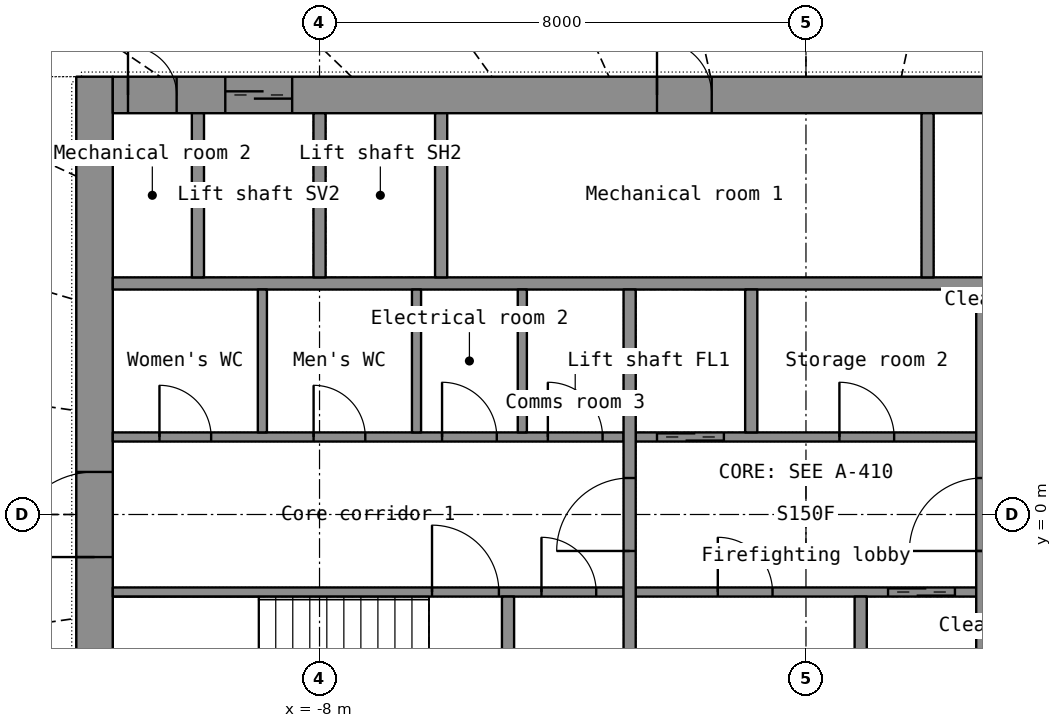
"""IFC4 building model, lengths in metres.
Left out: names, types, materials, properties, quantities, classifications, styles, units other than length and angle.
Written with IfcOpenShell. Run it as: python <this file> out.ifc"""

import sys

from ifc_helpers import new_model, si_unit, direction, frame, frame_2d, origin, place, context, subcontext, project, spatial, rectangle, extrude, element, fill, save


model = new_model("IFC4")
c1 = context("Model", 3, precision=1e-05, world=origin(), true_north=direction((0.0, 1.0)))
c2 = subcontext(c1, "Body", "Model", "MODEL_VIEW")
j1 = project(units=[si_unit("LENGTHUNIT", "METRE"), si_unit("PLANEANGLEUNIT", "RADIAN")], contexts=[c1])
p1 = place(None, origin())
s1 = spatial("IfcSite", under=j1, at=p1, CompositionType="ELEMENT")
p2 = place(p1, origin())
s2 = spatial("IfcBuilding", under=s1, at=p2, CompositionType="ELEMENT")
p3 = place(p2, frame((0.0, 0.0, 66.7)))
s3 = spatial("IfcBuildingStorey", under=s2, at=p3, CompositionType="ELEMENT", Elevation=66.7)
p4 = place(p3, frame((-11.7, -7.2, 0.0), z_axis=(0.0, 0.0, 1.0), x_axis=(0.0, 1.0, 0.0)))
e1 = element("IfcWall", 1, at=p4, inside=s3, PredefinedType="SHEAR", context=c2, shape_type="SweptSolid", body=[
    extrude(rectangle(XDim=14.4, YDim=0.6, at=frame_2d((7.2, 0.0))), origin(), (0.0, 0.0, 1.0), 3.3),
])
p5 = place(p4, frame((6.5, 0.0, 0.0)))
e2 = element("IfcOpeningElement", 2, at=p5, cuts=e1, PredefinedType="OPENING", context=c2, shape_type="SweptSolid", body=[
    extrude(rectangle(XDim=1.4, YDim=2.2, at=frame_2d((0.7, 1.1))), frame((0.0, 0.31, 0.0), z_axis=(0.0, -1.0, 0.0), x_axis=(1.0, 0.0, 0.0)), (0.0, 0.0, 1.0), 0.62),
])
p6 = place(p3, frame((-11.4, 6.9, 0.0), z_axis=(0.0, 0.0, 1.0), x_axis=(1.0, 0.0, 0.0)))
e3 = element("IfcWall", 3, at=p6, inside=s3, PredefinedType="SHEAR", context=c2, shape_type="SweptSolid", body=[
    extrude(rectangle(XDim=22.8, YDim=0.6, at=frame_2d((11.4, 0.0))), origin(), (0.0, 0.0, 1.0), 3.3),
])
p7 = place(p6, frame((1.85, 0.0, 0.0)))
e4 = element("IfcOpeningElement", 4, at=p7, cuts=e3, PredefinedType="OPENING", context=c2, shape_type="SweptSolid", body=[
    extrude(rectangle(XDim=1.1, YDim=2.2, at=frame_2d((0.55, 1.1))), frame((0.0, 0.31, 0.0), z_axis=(0.0, -1.0, 0.0), x_axis=(1.0, 0.0, 0.0)), (0.0, 0.0, 1.0), 0.62),
])
p8 = place(p6, frame((8.95, 0.0, 0.0)))
e5 = element("IfcOpeningElement", 5, at=p8, cuts=e3, PredefinedType="OPENING", context=c2, shape_type="SweptSolid", body=[
    extrude(rectangle(XDim=0.9, YDim=2.1, at=frame_2d((0.45, 1.05))), frame((0.0, 0.31, 0.0), z_axis=(0.0, -1.0, 0.0), x_axis=(1.0, 0.0, 0.0)), (0.0, 0.0, 1.0), 0.62),
])
p9 = place(p6, frame((14.95, 0.0, 0.0)))
e6 = element("IfcOpeningElement", 6, at=p9, cuts=e3, PredefinedType="OPENING", context=c2, shape_type="SweptSolid", body=[
    extrude(rectangle(XDim=0.9, YDim=2.1, at=frame_2d((0.45, 1.05))), frame((0.0, 0.31, 0.0), z_axis=(0.0, -1.0, 0.0), x_axis=(1.0, 0.0, 0.0)), (0.0, 0.0, 1.0), 0.62),
])
p10 = place(p6, frame((18.95, 0.0, 0.0)))
e7 = element("IfcOpeningElement", 7, at=p10, cuts=e3, PredefinedType="OPENING", context=c2, shape_type="SweptSolid", body=[
    extrude(rectangle(XDim=0.9, YDim=2.1, at=frame_2d((0.45, 1.05))), frame((0.0, 0.31, 0.0), z_axis=(0.0, -1.0, 0.0), x_axis=(1.0, 0.0, 0.0)), (0.0, 0.0, 1.0), 0.62),
])
p11 = place(p6, frame((0.25, 0.0, 0.0)))
e8 = element("IfcOpeningElement", 8, at=p11, cuts=e3, PredefinedType="OPENING", context=c2, shape_type="SweptSolid", body=[
    extrude(rectangle(XDim=0.8, YDim=2.05, at=frame_2d((0.4, 1.025))), frame((0.0, 0.31, 0.0), z_axis=(0.0, -1.0, 0.0), x_axis=(1.0, 0.0, 0.0)), (0.0, 0.0, 1.0), 0.62),
])
p12 = place(p6, frame((21.75, 0.0, 0.0)))
e9 = element("IfcOpeningElement", 9, at=p12, cuts=e3, PredefinedType="OPENING", context=c2, shape_type="SweptSolid", body=[
    extrude(rectangle(XDim=0.8, YDim=2.05, at=frame_2d((0.4, 1.025))), frame((0.0, 0.31, 0.0), z_axis=(0.0, -1.0, 0.0), x_axis=(1.0, 0.0, 0.0)), (0.0, 0.0, 1.0), 0.62),
])
p13 = place(p3, frame((-11.4, 3.8, 0.0), z_axis=(0.0, 0.0, 1.0), x_axis=(1.0, 0.0, 0.0)))
e10 = element("IfcWall", 10, at=p13, inside=s3, PredefinedType="SHEAR", context=c2, shape_type="SweptSolid", body=[
    extrude(rectangle(XDim=22.8, YDim=0.2, at=frame_2d((11.4, 0.0))), origin(), (0.0, 0.0, 1.0), 3.3),
])
for number, where, z_axis, x_axis in (
    (11, (-10.0, 3.9, 0.0), (0.0, 0.0, 1.0), (0.0, 1.0, 0.0)),
    (12, (-8.0, 3.9, 0.0), (0.0, 0.0, 1.0), (0.0, 1.0, 0.0)),
    (13, (-6.0, 3.9, 0.0), (0.0, 0.0, 1.0), (0.0, 1.0, 0.0)),
):
    element("IfcWall", number, at=place(p3, frame(where, z_axis=z_axis, x_axis=x_axis)), inside=s3, PredefinedType="SHEAR", context=c2, shape_type="SweptSolid", body=[
        extrude(rectangle(XDim=2.7, YDim=0.2, at=frame_2d((1.35, 0.0))), origin(), (0.0, 0.0, 1.0), 3.3),
    ])
p14 = place(p3, frame((2.0, 3.9, 0.0), z_axis=(0.0, 0.0, 1.0), x_axis=(0.0, 1.0, 0.0)))
e14 = element("IfcWall", 14, at=p14, inside=s3, PredefinedType="PARTITIONING", context=c2, shape_type="SweptSolid", body=[
    extrude(rectangle(XDim=2.7, YDim=0.2, at=frame_2d((1.35, 0.0))), origin(), (0.0, 0.0, 1.0), 3.3),
])
p15 = place(p3, frame((-11.4, -1.275, 0.0), z_axis=(0.0, 0.0, 1.0), x_axis=(1.0, 0.0, 0.0)))
e15 = element("IfcWall", 15, at=p15, inside=s3, PredefinedType="SHEAR", context=c2, shape_type="SweptSolid", body=[
    extrude(rectangle(XDim=8.4, YDim=0.15, at=frame_2d((4.2, 0.0))), origin(), (0.0, 0.0, 1.0), 3.3),
])
p16 = place(p15, frame((5.25, 0.0, 0.0)))
e16 = element("IfcOpeningElement", 16, at=p16, cuts=e15, PredefinedType="OPENING", context=c2, shape_type="SweptSolid", body=[
    extrude(rectangle(XDim=1.1, YDim=2.15, at=frame_2d((0.55, 1.075))), frame((0.0, 0.085, 0.0), z_axis=(0.0, -1.0, 0.0), x_axis=(1.0, 0.0, 0.0)), (0.0, 0.0, 1.0), 0.17),
])
p17 = place(p15, frame((7.05, 0.0, 0.0)))
e17 = element("IfcOpeningElement", 17, at=p17, cuts=e15, PredefinedType="OPENING", context=c2, shape_type="SweptSolid", body=[
    extrude(rectangle(XDim=0.9, YDim=2.1, at=frame_2d((0.45, 1.05))), frame((0.0, 0.085, 0.0), z_axis=(0.0, -1.0, 0.0), x_axis=(1.0, 0.0, 0.0)), (0.0, 0.0, 1.0), 0.17),
])
p18 = place(p3, frame((-2.8, -1.275, 0.0), z_axis=(0.0, 0.0, 1.0), x_axis=(1.0, 0.0, 0.0)))
e18 = element("IfcWall", 18, at=p18, inside=s3, PredefinedType="SHEAR", context=c2, shape_type="SweptSolid", body=[
    extrude(rectangle(XDim=5.6, YDim=0.15, at=frame_2d((2.8, 0.0))), origin(), (0.0, 0.0, 1.0), 3.3),
])
p19 = place(p18, frame((4.15, 0.0, 0.0)))
e19 = element("IfcOpeningElement", 19, at=p19, cuts=e18, PredefinedType="OPENING", context=c2, shape_type="SweptSolid", body=[
    extrude(rectangle(XDim=1.1, YDim=2.2, at=frame_2d((0.55, 1.1))), frame((0.0, 0.085, 0.0), z_axis=(0.0, -1.0, 0.0), x_axis=(1.0, 0.0, 0.0)), (0.0, 0.0, 1.0), 0.17),
])
p20 = place(p18, frame((1.35, 0.0, 0.0)))
e20 = element("IfcOpeningElement", 20, at=p20, cuts=e18, PredefinedType="OPENING", context=c2, shape_type="SweptSolid", body=[
    extrude(rectangle(XDim=0.9, YDim=2.1, at=frame_2d((0.45, 1.05))), frame((0.0, 0.085, 0.0), z_axis=(0.0, -1.0, 0.0), x_axis=(1.0, 0.0, 0.0)), (0.0, 0.0, 1.0), 0.17),
])
p21 = place(p3, frame((-11.4, 1.275, 0.0), z_axis=(0.0, 0.0, 1.0), x_axis=(1.0, 0.0, 0.0)))
e21 = element("IfcWall", 21, at=p21, inside=s3, PredefinedType="PARTITIONING", context=c2, shape_type="SweptSolid", body=[
    extrude(rectangle(XDim=8.4, YDim=0.15, at=frame_2d((4.2, 0.0))), origin(), (0.0, 0.0, 1.0), 3.3),
])
p22 = place(p21, frame((0.768, 0.0, 0.0)))
e22 = element("IfcOpeningElement", 22, at=p22, cuts=e21, PredefinedType="OPENING", context=c2, shape_type="SweptSolid", body=[
    extrude(rectangle(XDim=0.85, YDim=2.1, at=frame_2d((0.425, 1.05))), frame((0.0, 0.085, 0.0), z_axis=(0.0, -1.0, 0.0), x_axis=(1.0, 0.0, 0.0)), (0.0, 0.0, 1.0), 0.17),
])
p23 = place(p21, frame((3.302, 0.0, 0.0)))
e23 = element("IfcOpeningElement", 23, at=p23, cuts=e21, PredefinedType="OPENING", context=c2, shape_type="SweptSolid", body=[
    extrude(rectangle(XDim=0.85, YDim=2.1, at=frame_2d((0.425, 1.05))), frame((0.0, 0.085, 0.0), z_axis=(0.0, -1.0, 0.0), x_axis=(1.0, 0.0, 0.0)), (0.0, 0.0, 1.0), 0.17),
])
p24 = place(p21, frame((5.415, 0.0, 0.0)))
e24 = element("IfcOpeningElement", 24, at=p24, cuts=e21, PredefinedType="OPENING", context=c2, shape_type="SweptSolid", body=[
    extrude(rectangle(XDim=0.9, YDim=2.1, at=frame_2d((0.45, 1.05))), frame((0.0, 0.085, 0.0), z_axis=(0.0, -1.0, 0.0), x_axis=(1.0, 0.0, 0.0)), (0.0, 0.0, 1.0), 0.17),
])
p25 = place(p21, frame((7.155, 0.0, 0.0)))
e25 = element("IfcOpeningElement", 25, at=p25, cuts=e21, PredefinedType="OPENING", context=c2, shape_type="SweptSolid", body=[
    extrude(rectangle(XDim=0.9, YDim=2.1, at=frame_2d((0.45, 1.05))), frame((0.0, 0.085, 0.0), z_axis=(0.0, -1.0, 0.0), x_axis=(1.0, 0.0, 0.0)), (0.0, 0.0, 1.0), 0.17),
])
p26 = place(p3, frame((-2.8, 1.275, 0.0), z_axis=(0.0, 0.0, 1.0), x_axis=(1.0, 0.0, 0.0)))
e26 = element("IfcWall", 26, at=p26, inside=s3, PredefinedType="SHEAR", context=c2, shape_type="SweptSolid", body=[
    extrude(rectangle(XDim=5.6, YDim=0.15, at=frame_2d((2.8, 0.0))), origin(), (0.0, 0.0, 1.0), 3.3),
])
p27 = place(p26, frame((0.35, 0.0, 0.0)))
e27 = element("IfcOpeningElement", 27, at=p27, cuts=e26, PredefinedType="OPENING", context=c2, shape_type="SweptSolid", body=[
    extrude(rectangle(XDim=1.1, YDim=2.2, at=frame_2d((0.55, 1.1))), frame((0.0, 0.085, 0.0), z_axis=(0.0, -1.0, 0.0), x_axis=(1.0, 0.0, 0.0)), (0.0, 0.0, 1.0), 0.17),
])
p28 = place(p26, frame((3.35, 0.0, 0.0)))
e28 = element("IfcOpeningElement", 28, at=p28, cuts=e26, PredefinedType="OPENING", context=c2, shape_type="SweptSolid", body=[
    extrude(rectangle(XDim=0.9, YDim=2.1, at=frame_2d((0.45, 1.05))), frame((0.0, 0.085, 0.0), z_axis=(0.0, -1.0, 0.0), x_axis=(1.0, 0.0, 0.0)), (0.0, 0.0, 1.0), 0.17),
])
p29 = place(p3, frame((-2.9, -3.7, 0.0), z_axis=(0.0, 0.0, 1.0), x_axis=(0.0, 1.0, 0.0)))
e29 = element("IfcWall", 29, at=p29, inside=s3, PredefinedType="SHEAR", context=c2, shape_type="SweptSolid", body=[
    extrude(rectangle(XDim=7.4, YDim=0.2, at=frame_2d((3.7, 0.0))), origin(), (0.0, 0.0, 1.0), 3.3),
])
p30 = place(p29, frame((3.1, 0.0, 0.0)))
e30 = element("IfcOpeningElement", 30, at=p30, cuts=e29, PredefinedType="OPENING", context=c2, shape_type="SweptSolid", body=[
    extrude(rectangle(XDim=1.2, YDim=2.2, at=frame_2d((0.6, 1.1))), frame((0.0, 0.11, 0.0), z_axis=(0.0, -1.0, 0.0), x_axis=(1.0, 0.0, 0.0)), (0.0, 0.0, 1.0), 0.22),
])
p31 = place(p3, frame((2.9, -3.7, 0.0), z_axis=(0.0, 0.0, 1.0), x_axis=(0.0, 1.0, 0.0)))
e31 = element("IfcWall", 31, at=p31, inside=s3, PredefinedType="SHEAR", context=c2, shape_type="SweptSolid", body=[
    extrude(rectangle(XDim=7.4, YDim=0.2, at=frame_2d((3.7, 0.0))), origin(), (0.0, 0.0, 1.0), 3.3),
])
p32 = place(p31, frame((3.1, 0.0, 0.0)))
e32 = element("IfcOpeningElement", 32, at=p32, cuts=e31, PredefinedType="OPENING", context=c2, shape_type="SweptSolid", body=[
    extrude(rectangle(XDim=1.2, YDim=2.2, at=frame_2d((0.6, 1.1))), frame((0.0, 0.11, 0.0), z_axis=(0.0, -1.0, 0.0), x_axis=(1.0, 0.0, 0.0)), (0.0, 0.0, 1.0), 0.22),
])
for number, where, z_axis, x_axis in (
    (33, (-0.9, 1.35, 0.0), (0.0, 0.0, 1.0), (0.0, 1.0, 0.0)),
    (34, (0.9, -3.7, 0.0), (0.0, 0.0, 1.0), (0.0, 1.0, 0.0)),
    (35, (-4.9, -3.7, 0.0), (0.0, 0.0, 1.0), (0.0, 1.0, 0.0)),
):
    element("IfcWall", number, at=place(p3, frame(where, z_axis=z_axis, x_axis=x_axis)), inside=s3, PredefinedType="SHEAR", context=c2, shape_type="SweptSolid", body=[
        extrude(rectangle(XDim=2.35, YDim=0.2, at=frame_2d((1.175, 0.0))), origin(), (0.0, 0.0, 1.0), 3.3),
    ])
for number, where, z_axis, x_axis in (
    (36, (-8.94, 1.35, 0.0), (0.0, 0.0, 1.0), (0.0, 1.0, 0.0)),
    (37, (-6.405, 1.35, 0.0), (0.0, 0.0, 1.0), (0.0, 1.0, 0.0)),
    (38, (-4.665, 1.35, 0.0), (0.0, 0.0, 1.0), (0.0, 1.0, 0.0)),
):
    element("IfcWall", number, at=place(p3, frame(where, z_axis=z_axis, x_axis=x_axis)), inside=s3, PredefinedType="PARTITIONING", context=c2, shape_type="SweptSolid", body=[
        extrude(rectangle(XDim=2.35, YDim=0.15, at=frame_2d((1.175, 0.0))), origin(), (0.0, 0.0, 1.0), 3.3),
    ])
p33 = place(p7, origin())
e39 = element("IfcDoor", 39, at=p33, inside=s3, OperationType="DOUBLE_DOOR_SLIDING", PredefinedType="DOOR", context=c2, shape_type="SweptSolid", body=[
    extrude(rectangle(XDim=1.1, YDim=2.2, at=frame_2d((0.55, 1.1))), frame((0.0, 0.025, 0.0), z_axis=(0.0, -1.0, 0.0), x_axis=(1.0, 0.0, 0.0)), (0.0, 0.0, 1.0), 0.05),
])
fill(e4, e39)
p34 = place(p8, origin())
e40 = element("IfcDoor", 40, at=p34, inside=s3, OperationType="SINGLE_SWING_LEFT", PredefinedType="DOOR", context=c2, shape_type="SweptSolid", body=[
    extrude(rectangle(XDim=0.9, YDim=2.1, at=frame_2d((0.45, 1.05))), frame((0.0, 0.025, 0.0), z_axis=(0.0, -1.0, 0.0), x_axis=(1.0, 0.0, 0.0)), (0.0, 0.0, 1.0), 0.05),
])
fill(e5, e40)
p35 = place(p11, origin())
e41 = element("IfcDoor", 41, at=p35, inside=s3, OperationType="SINGLE_SWING_LEFT", PredefinedType="DOOR", context=c2, shape_type="SweptSolid", body=[
    extrude(rectangle(XDim=0.8, YDim=2.05, at=frame_2d((0.4, 1.025))), frame((0.0, 0.025, 0.0), z_axis=(0.0, -1.0, 0.0), x_axis=(1.0, 0.0, 0.0)), (0.0, 0.0, 1.0), 0.05),
])
fill(e8, e41)
p36 = place(p5, origin())
e42 = element("IfcDoor", 42, at=p36, inside=s3, OperationType="DOUBLE_DOOR_SINGLE_SWING", PredefinedType="DOOR", context=c2, shape_type="SweptSolid", body=[
    extrude(rectangle(XDim=1.4, YDim=2.2, at=frame_2d((0.7, 1.1))), frame((0.0, 0.025, 0.0), z_axis=(0.0, -1.0, 0.0), x_axis=(1.0, 0.0, 0.0)), (0.0, 0.0, 1.0), 0.05),
])
fill(e2, e42)
p37 = place(p30, origin())
e43 = element("IfcDoor", 43, at=p37, inside=s3, OperationType="SINGLE_SWING_LEFT", PredefinedType="DOOR", context=c2, shape_type="SweptSolid", body=[
    extrude(rectangle(XDim=1.2, YDim=2.2, at=frame_2d((0.6, 1.1))), frame((0.0, 0.025, 0.0), z_axis=(0.0, -1.0, 0.0), x_axis=(1.0, 0.0, 0.0)), (0.0, 0.0, 1.0), 0.05),
])
fill(e30, e43)
p38 = place(p32, origin())
e44 = element("IfcDoor", 44, at=p38, inside=s3, OperationType="SINGLE_SWING_LEFT", PredefinedType="DOOR", context=c2, shape_type="SweptSolid", body=[
    extrude(rectangle(XDim=1.2, YDim=2.2, at=frame_2d((0.6, 1.1))), frame((0.0, 0.025, 0.0), z_axis=(0.0, -1.0, 0.0), x_axis=(1.0, 0.0, 0.0)), (0.0, 0.0, 1.0), 0.05),
])
fill(e32, e44)
p39 = place(p27, origin())
e45 = element("IfcDoor", 45, at=p39, inside=s3, OperationType="DOUBLE_DOOR_SLIDING", PredefinedType="DOOR", context=c2, shape_type="SweptSolid", body=[
    extrude(rectangle(XDim=1.1, YDim=2.2, at=frame_2d((0.55, 1.1))), frame((0.0, 0.025, 0.0), z_axis=(0.0, -1.0, 0.0), x_axis=(1.0, 0.0, 0.0)), (0.0, 0.0, 1.0), 0.05),
])
fill(e27, e45)
p40 = place(p19, origin())
e46 = element("IfcDoor", 46, at=p40, inside=s3, OperationType="DOUBLE_DOOR_SLIDING", PredefinedType="DOOR", context=c2, shape_type="SweptSolid", body=[
    extrude(rectangle(XDim=1.1, YDim=2.2, at=frame_2d((0.55, 1.1))), frame((0.0, 0.025, 0.0), z_axis=(0.0, -1.0, 0.0), x_axis=(1.0, 0.0, 0.0)), (0.0, 0.0, 1.0), 0.05),
])
fill(e19, e46)
p41 = place(p16, origin())
e47 = element("IfcDoor", 47, at=p41, inside=s3, OperationType="SINGLE_SWING_LEFT", PredefinedType="DOOR", context=c2, shape_type="SweptSolid", body=[
    extrude(rectangle(XDim=1.1, YDim=2.15, at=frame_2d((0.55, 1.075))), frame((0.0, 0.025, 0.0), z_axis=(0.0, -1.0, 0.0), x_axis=(1.0, 0.0, 0.0)), (0.0, 0.0, 1.0), 0.05),
])
fill(e16, e47)
p42 = place(p22, origin())
e48 = element("IfcDoor", 48, at=p42, inside=s3, OperationType="SINGLE_SWING_LEFT", PredefinedType="DOOR", context=c2, shape_type="SweptSolid", body=[
    extrude(rectangle(XDim=0.85, YDim=2.1, at=frame_2d((0.425, 1.05))), frame((0.0, 0.025, 0.0), z_axis=(0.0, -1.0, 0.0), x_axis=(1.0, 0.0, 0.0)), (0.0, 0.0, 1.0), 0.05),
])
fill(e22, e48)
p43 = place(p23, origin())
e49 = element("IfcDoor", 49, at=p43, inside=s3, OperationType="SINGLE_SWING_LEFT", PredefinedType="DOOR", context=c2, shape_type="SweptSolid", body=[
    extrude(rectangle(XDim=0.85, YDim=2.1, at=frame_2d((0.425, 1.05))), frame((0.0, 0.025, 0.0), z_axis=(0.0, -1.0, 0.0), x_axis=(1.0, 0.0, 0.0)), (0.0, 0.0, 1.0), 0.05),
])
fill(e23, e49)
p44 = place(p24, origin())
e50 = element("IfcDoor", 50, at=p44, inside=s3, OperationType="SINGLE_SWING_LEFT", PredefinedType="DOOR", context=c2, shape_type="SweptSolid", body=[
    extrude(rectangle(XDim=0.9, YDim=2.1, at=frame_2d((0.45, 1.05))), frame((0.0, 0.025, 0.0), z_axis=(0.0, -1.0, 0.0), x_axis=(1.0, 0.0, 0.0)), (0.0, 0.0, 1.0), 0.05),
])
fill(e24, e50)
p45 = place(p25, origin())
e51 = element("IfcDoor", 51, at=p45, inside=s3, OperationType="SINGLE_SWING_LEFT", PredefinedType="DOOR", context=c2, shape_type="SweptSolid", body=[
    extrude(rectangle(XDim=0.9, YDim=2.1, at=frame_2d((0.45, 1.05))), frame((0.0, 0.025, 0.0), z_axis=(0.0, -1.0, 0.0), x_axis=(1.0, 0.0, 0.0)), (0.0, 0.0, 1.0), 0.05),
])
fill(e25, e51)
p46 = place(p28, origin())
e52 = element("IfcDoor", 52, at=p46, inside=s3, OperationType="SINGLE_SWING_LEFT", PredefinedType="DOOR", context=c2, shape_type="SweptSolid", body=[
    extrude(rectangle(XDim=0.9, YDim=2.1, at=frame_2d((0.45, 1.05))), frame((0.0, 0.025, 0.0), z_axis=(0.0, -1.0, 0.0), x_axis=(1.0, 0.0, 0.0)), (0.0, 0.0, 1.0), 0.05),
])
fill(e28, e52)
p47 = place(p20, origin())
e53 = element("IfcDoor", 53, at=p47, inside=s3, OperationType="SINGLE_SWING_LEFT", PredefinedType="DOOR", context=c2, shape_type="SweptSolid", body=[
    extrude(rectangle(XDim=0.9, YDim=2.1, at=frame_2d((0.45, 1.05))), frame((0.0, 0.025, 0.0), z_axis=(0.0, -1.0, 0.0), x_axis=(1.0, 0.0, 0.0)), (0.0, 0.0, 1.0), 0.05),
])
fill(e20, e53)
p48 = place(p17, origin())
e54 = element("IfcDoor", 54, at=p48, inside=s3, OperationType="SINGLE_SWING_LEFT", PredefinedType="DOOR", context=c2, shape_type="SweptSolid", body=[
    extrude(rectangle(XDim=0.9, YDim=2.1, at=frame_2d((0.45, 1.05))), frame((0.0, 0.025, 0.0), z_axis=(0.0, -1.0, 0.0), x_axis=(1.0, 0.0, 0.0)), (0.0, 0.0, 1.0), 0.05),
])
fill(e17, e54)
save(model, sys.argv[1])
